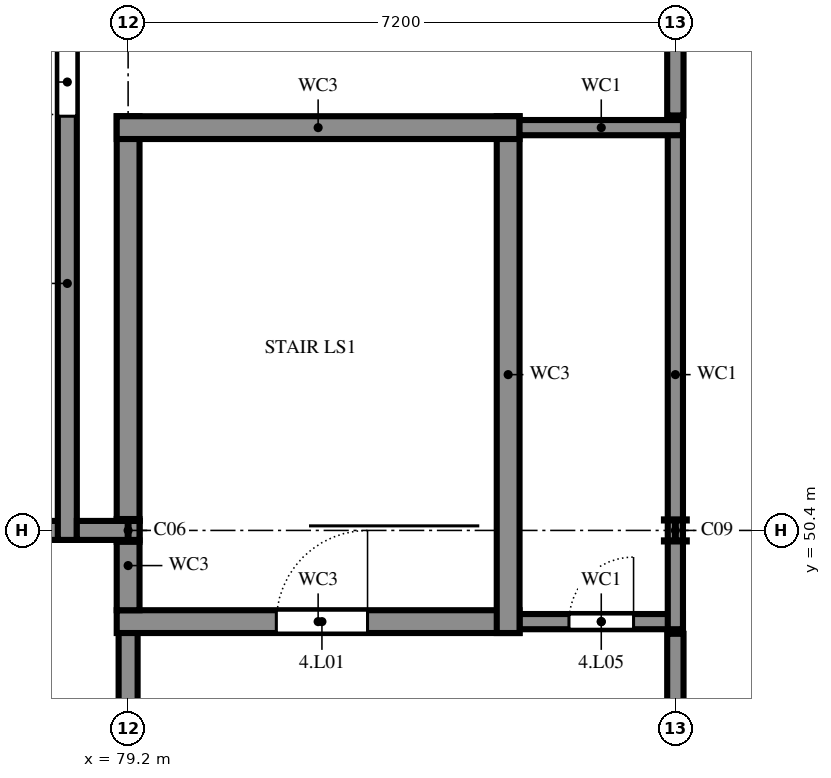
"""IFC4 building model, lengths in metres.
Left out: names, types, materials, properties, quantities, classifications, styles, units other than length and angle.
Written with IfcOpenShell. Run it as: python <this file> out.ifc"""

import sys

from ifc_helpers import new_model, si_unit, direction, frame, frame_2d, origin, origin_2d, place, context, subcontext, project, spatial, rectangle, i_section, extrude, element, fill, save


model = new_model("IFC4")
c1 = context("Model", 3, precision=1e-05, world=origin(), true_north=direction((0.0, 1.0)))
c2 = subcontext(c1, "Body", "Model", "MODEL_VIEW")
j1 = project(units=[si_unit("LENGTHUNIT", "METRE"), si_unit("PLANEANGLEUNIT", "RADIAN")], contexts=[c1])
p1 = place(None, origin())
s1 = spatial("IfcSite", under=j1, at=p1, CompositionType="ELEMENT")
p2 = place(p1, origin())
s2 = spatial("IfcBuilding", under=s1, at=p2, CompositionType="ELEMENT")
p3 = place(p2, frame((0.0, 0.0, 14.4)))
s3 = spatial("IfcBuildingStorey", under=s2, at=p3, CompositionType="ELEMENT", Elevation=14.4)
p4 = place(p3, frame((79.2, 50.4, 0.0), z_axis=(0.0, 0.0, 1.0), x_axis=(1.0, 0.0, 0.0)))
e1 = element("IfcColumn", 1, at=p4, inside=s3, PredefinedType="COLUMN", context=c2, shape_type="SweptSolid", body=[
    extrude(i_section(OverallWidth=0.3, OverallDepth=0.3, WebThickness=0.011, FlangeThickness=0.019, FilletRadius=0.027, at=origin_2d()), origin(), (0.0, 0.0, 1.0), 3.6),
])
p5 = place(p3, frame((86.4, 50.4, 0.0), z_axis=(0.0, 0.0, 1.0), x_axis=(1.0, 0.0, 0.0)))
e2 = element("IfcColumn", 2, at=p5, inside=s3, PredefinedType="COLUMN", context=c2, shape_type="SweptSolid", body=[
    extrude(i_section(OverallWidth=0.3, OverallDepth=0.29, WebThickness=0.009, FlangeThickness=0.014, FilletRadius=0.027, at=origin_2d()), origin(), (0.0, 0.0, 1.0), 3.6),
])
p6 = place(p3, frame((79.2, 44.275, 0.0), z_axis=(0.0, 0.0, 1.0), x_axis=(0.0, 1.0, 0.0)))
e3 = element("IfcWall", 3, at=p6, inside=s3, PredefinedType="SHEAR", context=c2, shape_type="SweptSolid", body=[
    extrude(rectangle(XDim=5.075, YDim=0.25, at=frame_2d((2.538, 0.0))), origin(), (0.0, 0.0, 1.0), 3.6),
])
p7 = place(p3, frame((79.05, 49.2, 0.0), z_axis=(0.0, 0.0, 1.0), x_axis=(1.0, 0.0, 0.0)))
e4 = element("IfcWall", 4, at=p7, inside=s3, PredefinedType="SHEAR", context=c2, shape_type="SweptSolid", body=[
    extrude(rectangle(XDim=5.3, YDim=0.3, at=frame_2d((2.65, 0.0))), origin(), (0.0, 0.0, 1.0), 3.6),
])
p8 = place(p7, frame((2.1, 0.0, 0.0)))
e5 = element("IfcOpeningElement", 5, at=p8, cuts=e4, PredefinedType="OPENING", context=c2, shape_type="SweptSolid", body=[
    extrude(rectangle(XDim=1.2, YDim=2.4, at=frame_2d((0.6, 1.2))), frame((0.0, 0.16, 0.0), z_axis=(0.0, -1.0, 0.0), x_axis=(1.0, 0.0, 0.0)), (0.0, 0.0, 1.0), 0.32),
])
p9 = place(p3, frame((79.2, 49.35, 0.0), z_axis=(0.0, 0.0, 1.0), x_axis=(0.0, 1.0, 0.0)))
e6 = element("IfcWall", 6, at=p9, inside=s3, PredefinedType="SHEAR", context=c2, shape_type="SweptSolid", body=[
    extrude(rectangle(XDim=1.175, YDim=0.3, at=frame_2d((0.587, 0.0))), origin(), (0.0, 0.0, 1.0), 3.6),
])
p10 = place(p3, frame((84.35, 49.2, 0.0), z_axis=(0.0, 0.0, 1.0), x_axis=(1.0, 0.0, 0.0)))
e7 = element("IfcWall", 7, at=p10, inside=s3, PredefinedType="SHEAR", context=c2, shape_type="SweptSolid", body=[
    extrude(rectangle(XDim=2.15, YDim=0.2, at=frame_2d((1.075, 0.0))), origin(), (0.0, 0.0, 1.0), 3.6),
])
p11 = place(p10, frame((0.65, 0.0, 0.0)))
e8 = element("IfcOpeningElement", 8, at=p11, cuts=e7, PredefinedType="OPENING", context=c2, shape_type="SweptSolid", body=[
    extrude(rectangle(XDim=0.85, YDim=2.1, at=frame_2d((0.425, 1.05))), frame((0.0, 0.11, 0.0), z_axis=(0.0, -1.0, 0.0), x_axis=(1.0, 0.0, 0.0)), (0.0, 0.0, 1.0), 0.22),
])
p12 = place(p3, frame((84.2, 49.05, 0.0), z_axis=(0.0, 0.0, 1.0), x_axis=(0.0, 1.0, 0.0)))
e9 = element("IfcWall", 9, at=p12, inside=s3, PredefinedType="SHEAR", context=c2, shape_type="SweptSolid", body=[
    extrude(rectangle(XDim=6.8, YDim=0.3, at=frame_2d((3.4, 0.0))), origin(), (0.0, 0.0, 1.0), 3.6),
])
p13 = place(p3, frame((86.4, 49.1, 0.0), z_axis=(0.0, 0.0, 1.0), x_axis=(0.0, 1.0, 0.0)))
e10 = element("IfcWall", 10, at=p13, inside=s3, PredefinedType="SHEAR", context=c2, shape_type="SweptSolid", body=[
    extrude(rectangle(XDim=6.7, YDim=0.2, at=frame_2d((3.35, 0.0))), origin(), (0.0, 0.0, 1.0), 3.6),
])
p14 = place(p3, frame((78.525, 50.4, 0.0), z_axis=(0.0, 0.0, 1.0), x_axis=(-1.0, 0.0, 0.0)))
e11 = element("IfcWall", 11, at=p14, inside=s3, PredefinedType="SHEAR", context=c2, shape_type="SweptSolid", body=[
    extrude(rectangle(XDim=3.6, YDim=0.25, at=frame_2d((1.8, 0.0))), origin(), (0.0, 0.0, 1.0), 3.6),
])
p15 = place(p3, frame((78.4, 50.275, 0.0), z_axis=(0.0, 0.0, 1.0), x_axis=(0.0, 1.0, 0.0)))
e12 = element("IfcWall", 12, at=p15, inside=s3, PredefinedType="SHEAR", context=c2, shape_type="SweptSolid", body=[
    extrude(rectangle(XDim=6.75, YDim=0.25, at=frame_2d((3.375, 0.0))), origin(), (0.0, 0.0, 1.0), 3.6),
])
p16 = place(p15, frame((5.575, 0.0, 0.0)))
e13 = element("IfcOpeningElement", 13, at=p16, cuts=e12, PredefinedType="OPENING", context=c2, shape_type="SweptSolid", body=[
    extrude(rectangle(XDim=0.9, YDim=2.1, at=frame_2d((0.45, 1.05))), frame((0.0, 0.135, 0.0), z_axis=(0.0, -1.0, 0.0), x_axis=(1.0, 0.0, 0.0)), (0.0, 0.0, 1.0), 0.27),
])
p17 = place(p3, frame((79.35, 50.4, 0.0), z_axis=(0.0, 0.0, 1.0), x_axis=(-1.0, 0.0, 0.0)))
e14 = element("IfcWall", 14, at=p17, inside=s3, PredefinedType="SHEAR", context=c2, shape_type="SweptSolid", body=[
    extrude(rectangle(XDim=0.825, YDim=0.25, at=frame_2d((0.413, 0.0))), origin(), (0.0, 0.0, 1.0), 3.6),
])
p18 = place(p3, frame((79.2, 55.85, 0.0), z_axis=(0.0, 0.0, 1.0), x_axis=(0.0, -1.0, 0.0)))
e15 = element("IfcWall", 15, at=p18, inside=s3, PredefinedType="SHEAR", context=c2, shape_type="SweptSolid", body=[
    extrude(rectangle(XDim=5.325, YDim=0.3, at=frame_2d((2.663, 0.0))), origin(), (0.0, 0.0, 1.0), 3.6),
])
p19 = place(p3, frame((84.35, 55.7, 0.0), z_axis=(0.0, 0.0, 1.0), x_axis=(-1.0, 0.0, 0.0)))
e16 = element("IfcWall", 16, at=p19, inside=s3, PredefinedType="SHEAR", context=c2, shape_type="SweptSolid", body=[
    extrude(rectangle(XDim=5.3, YDim=0.3, at=frame_2d((2.65, 0.0))), origin(), (0.0, 0.0, 1.0), 3.6),
])
p20 = place(p3, frame((86.5, 55.7, 0.0), z_axis=(0.0, 0.0, 1.0), x_axis=(-1.0, 0.0, 0.0)))
e17 = element("IfcWall", 17, at=p20, inside=s3, PredefinedType="SHEAR", context=c2, shape_type="SweptSolid", body=[
    extrude(rectangle(XDim=2.15, YDim=0.2, at=frame_2d((1.075, 0.0))), origin(), (0.0, 0.0, 1.0), 3.6),
])
p21 = place(p3, frame((86.4, 43.48, 0.0), z_axis=(0.0, 0.0, 1.0), x_axis=(0.0, 1.0, 0.0)))
e18 = element("IfcWall", 18, at=p21, inside=s3, PredefinedType="PARTITIONING", context=c2, shape_type="SweptSolid", body=[
    extrude(rectangle(XDim=5.56, YDim=0.215, at=frame_2d((2.78, 0.0))), origin(), (0.0, 0.0, 1.0), 3.149),
])
p22 = place(p3, frame((86.4, 55.86, 0.0), z_axis=(0.0, 0.0, 1.0), x_axis=(0.0, 1.0, 0.0)))
e19 = element("IfcWall", 19, at=p22, inside=s3, PredefinedType="PARTITIONING", context=c2, shape_type="SweptSolid", body=[
    extrude(rectangle(XDim=1.985, YDim=0.215, at=frame_2d((0.992, 0.0))), origin(), (0.0, 0.0, 1.0), 3.6),
])
p23 = place(p16, origin())
e20 = element("IfcDoor", 20, at=p23, inside=s3, OperationType="SINGLE_SWING_LEFT", PredefinedType="DOOR", context=c2, shape_type="SweptSolid", body=[
    extrude(rectangle(XDim=0.9, YDim=2.1, at=frame_2d((0.45, 1.05))), frame((0.0, 0.025, 0.0), z_axis=(0.0, -1.0, 0.0), x_axis=(1.0, 0.0, 0.0)), (0.0, 0.0, 1.0), 0.05),
])
fill(e13, e20)
p24 = place(p8, origin())
e21 = element("IfcDoor", 21, at=p24, inside=s3, OperationType="SINGLE_SWING_LEFT", PredefinedType="DOOR", context=c2, shape_type="SweptSolid", body=[
    extrude(rectangle(XDim=1.2, YDim=2.4, at=frame_2d((0.6, 1.2))), frame((0.0, 0.025, 0.0), z_axis=(0.0, -1.0, 0.0), x_axis=(1.0, 0.0, 0.0)), (0.0, 0.0, 1.0), 0.05),
])
fill(e5, e21)
p25 = place(p11, origin())
e22 = element("IfcDoor", 22, at=p25, inside=s3, OperationType="SINGLE_SWING_LEFT", PredefinedType="DOOR", context=c2, shape_type="SweptSolid", body=[
    extrude(rectangle(XDim=0.85, YDim=2.1, at=frame_2d((0.425, 1.05))), frame((0.0, 0.025, 0.0), z_axis=(0.0, -1.0, 0.0), x_axis=(1.0, 0.0, 0.0)), (0.0, 0.0, 1.0), 0.05),
])
fill(e8, e22)
save(model, sys.argv[1])
